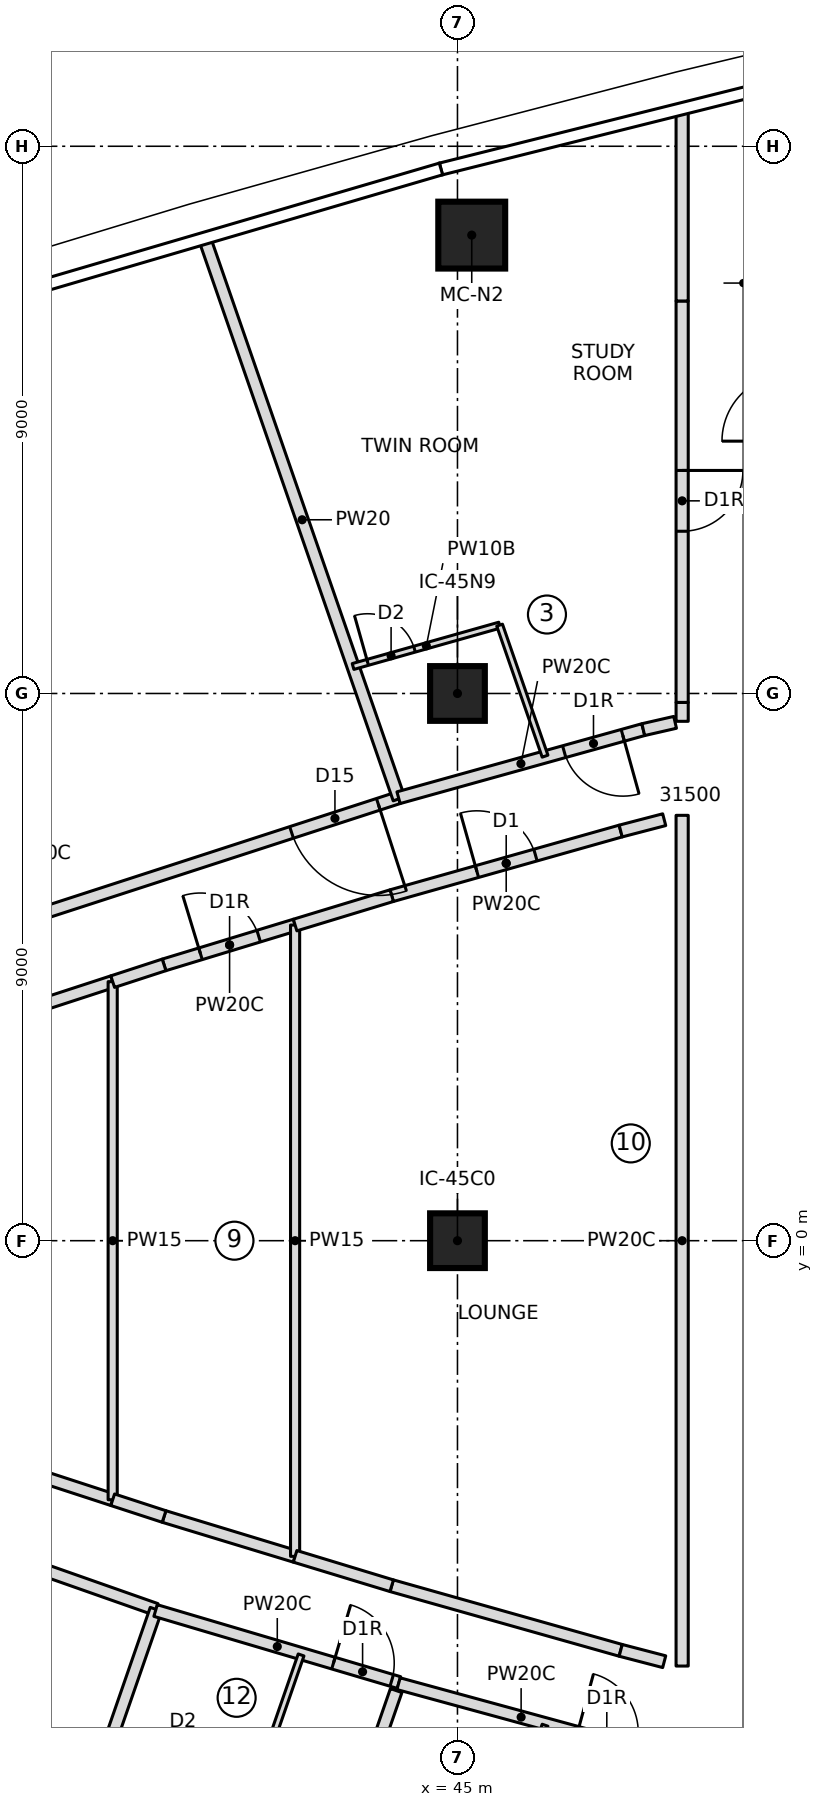
"""IFC4 building model, lengths in metres.
Left out: names, types, materials, properties, quantities, classifications, styles, units other than length and angle.
Written with IfcOpenShell. Run it as: python <this file> out.ifc"""

import sys

from ifc_helpers import new_model, si_unit, direction, frame, frame_2d, origin, origin_2d, place, context, subcontext, project, spatial, rectangle, extrude, element, fill, save


model = new_model("IFC4")
c1 = context("Model", 3, precision=1e-05, world=origin(), true_north=direction((0.0, 1.0)))
c2 = subcontext(c1, "Body", "Model", "MODEL_VIEW")
j1 = project(units=[si_unit("LENGTHUNIT", "METRE"), si_unit("PLANEANGLEUNIT", "RADIAN")], contexts=[c1])
p1 = place(None, origin())
s1 = spatial("IfcSite", under=j1, at=p1, CompositionType="ELEMENT")
p2 = place(p1, origin())
s2 = spatial("IfcBuilding", under=s1, at=p2, CompositionType="ELEMENT")
p3 = place(p2, frame((0.0, 0.0, 267.9)))
s3 = spatial("IfcBuildingStorey", under=s2, at=p3, CompositionType="ELEMENT", Elevation=267.9)
p4 = place(p3, frame((45.235, 16.539, 0.0), z_axis=(0.0, 0.0, 1.0), x_axis=(1.0, 0.0, 0.0)))
e1 = element("IfcColumn", 1, at=p4, inside=s3, PredefinedType="COLUMN", context=c2, shape_type="SweptSolid", body=[
    extrude(rectangle(XDim=1.1, YDim=1.1, at=origin_2d()), origin(), (0.0, 0.0, 1.0), 3.55),
])
for number, where, z_axis, x_axis in (
    (2, (45.0, 0.0, 0.0), (0.0, 0.0, 1.0), (1.0, 0.0, 0.0)),
    (3, (45.0, 9.0, 0.0), (0.0, 0.0, 1.0), (1.0, 0.0, 0.0)),
):
    element("IfcColumn", number, at=place(p3, frame(where, z_axis=z_axis, x_axis=x_axis)), inside=s3, PredefinedType="COLUMN", context=c2, shape_type="SweptSolid", body=[
        extrude(rectangle(XDim=0.9, YDim=0.9, at=origin_2d()), origin(), (0.0, 0.0, 1.0), 3.55),
    ])
p5 = place(p3, frame((44.031, 7.286, 0.0), z_axis=(0.0, 0.0, 1.0), x_axis=(-0.951130603276, -0.308788885019, 0.0)))
e4 = element("IfcWall", 4, at=p5, inside=s3, PredefinedType="PARTITIONING", context=c2, shape_type="SweptSolid", body=[
    extrude(rectangle(XDim=12.521, YDim=0.2, at=frame_2d((6.26, 0.0))), origin(), (0.0, 0.0, 1.0), 3.25),
])
p6 = place(p5, frame((0.35, 0.0, 0.0)))
e5 = element("IfcOpeningElement", 5, at=p6, cuts=e4, PredefinedType="OPENING", context=c2, shape_type="SweptSolid", body=[
    extrude(rectangle(XDim=1.5, YDim=2.1, at=frame_2d((0.75, 1.05))), frame((0.0, 0.11, 0.0), z_axis=(0.0, -1.0, 0.0), x_axis=(1.0, 0.0, 0.0)), (0.0, 0.0, 1.0), 0.22),
])
p7 = place(p3, frame((44.038, 7.267, 0.0), z_axis=(0.0, 0.0, 1.0), x_axis=(-0.327714576096, 0.944776776077, 0.0)))
e6 = element("IfcWall", 6, at=p7, inside=s3, PredefinedType="PARTITIONING", context=c2, shape_type="SweptSolid", body=[
    extrude(rectangle(XDim=9.717, YDim=0.2, at=frame_2d((4.858, 0.0))), origin(), (0.0, 0.0, 1.0), 3.25),
])
p8 = place(p3, frame((48.056, 8.405, 0.0), z_axis=(0.0, 0.0, 1.0), x_axis=(-0.963429942227, -0.267960344866, 0.0)))
e7 = element("IfcWall", 7, at=p8, inside=s3, PredefinedType="PARTITIONING", context=c2, shape_type="SweptSolid", body=[
    extrude(rectangle(XDim=4.177, YDim=0.2, at=frame_2d((2.089, 0.0))), origin(), (0.0, 0.0, 1.0), 3.25),
])
p9 = place(p8, frame((0.35, 0.0, 0.0)))
e8 = element("IfcOpeningElement", 8, at=p9, cuts=e7, PredefinedType="OPENING", context=c2, shape_type="SweptSolid", body=[
    extrude(rectangle(XDim=1.0, YDim=2.1, at=frame_2d((0.5, 1.05))), frame((0.0, 0.11, 0.0), z_axis=(0.0, -1.0, 0.0), x_axis=(1.0, 0.0, 0.0)), (0.0, 0.0, 1.0), 0.22),
])
p10 = place(p3, frame((43.283, 9.444, 0.0), z_axis=(0.0, 0.0, 1.0), x_axis=(0.962409173596, 0.271603723424, 0.0)))
e9 = element("IfcWall", 9, at=p10, inside=s3, PredefinedType="PARTITIONING", context=c2, shape_type="SweptSolid", body=[
    extrude(rectangle(XDim=2.504, YDim=0.1, at=frame_2d((1.252, 0.0))), origin(), (0.0, 0.0, 1.0), 3.25),
])
p11 = place(p10, frame((0.25, 0.0, 0.0)))
e10 = element("IfcOpeningElement", 10, at=p11, cuts=e9, PredefinedType="OPENING", context=c2, shape_type="SweptSolid", body=[
    extrude(rectangle(XDim=0.8, YDim=2.1, at=frame_2d((0.4, 1.05))), frame((0.0, 0.06, 0.0), z_axis=(0.0, -1.0, 0.0), x_axis=(1.0, 0.0, 0.0)), (0.0, 0.0, 1.0), 0.12),
])
p12 = place(p3, frame((45.693, 10.124, 0.0), z_axis=(0.0, 0.0, 1.0), x_axis=(0.327764902685, -0.944759317799, 0.0)))
e11 = element("IfcWall", 11, at=p12, inside=s3, PredefinedType="PARTITIONING", context=c2, shape_type="SweptSolid", body=[
    extrude(rectangle(XDim=2.281, YDim=0.1, at=frame_2d((1.14, 0.0))), origin(), (0.0, 0.0, 1.0), 3.25),
])
p13 = place(p3, frame((26.85, -1.423, 0.0), z_axis=(0.0, 0.0, 1.0), x_axis=(0.943328585164, -0.331860182022, 0.0)))
e12 = element("IfcWall", 12, at=p13, inside=s3, PredefinedType="PARTITIONING", context=c2, shape_type="SweptSolid", body=[
    extrude(rectangle(XDim=13.984, YDim=0.2, at=frame_2d((6.992, 0.0))), origin(), (0.0, 0.0, 1.0), 3.25),
])
p14 = place(p13, frame((3.05, 0.0, 0.0)))
e13 = element("IfcOpeningElement", 13, at=p14, cuts=e12, PredefinedType="OPENING", context=c2, shape_type="SweptSolid", body=[
    extrude(rectangle(XDim=1.5, YDim=2.1, at=frame_2d((0.75, 1.05))), frame((0.0, 0.11, 0.0), z_axis=(0.0, -1.0, 0.0), x_axis=(1.0, 0.0, 0.0)), (0.0, 0.0, 1.0), 0.22),
])
p15 = place(p3, frame((36.861, -15.235, 0.0), z_axis=(0.0, 0.0, 1.0), x_axis=(0.327710853631, 0.944778067279, 0.0)))
e14 = element("IfcWall", 14, at=p15, inside=s3, PredefinedType="PARTITIONING", context=c2, shape_type="SweptSolid", body=[
    extrude(rectangle(XDim=9.707, YDim=0.2, at=frame_2d((4.854, 0.0))), origin(), (0.0, 0.0, 1.0), 3.25),
])
p16 = place(p3, frame((40.035, -6.083, 0.0), z_axis=(0.0, 0.0, 1.0), x_axis=(0.958901312153, -0.283739799027, 0.0)))
e15 = element("IfcWall", 15, at=p16, inside=s3, PredefinedType="PARTITIONING", context=c2, shape_type="SweptSolid", body=[
    extrude(rectangle(XDim=4.174, YDim=0.2, at=frame_2d((2.087, 0.0))), origin(), (0.0, 0.0, 1.0), 3.25),
])
p17 = place(p16, frame((3.05, 0.0, 0.0)))
e16 = element("IfcOpeningElement", 16, at=p17, cuts=e15, PredefinedType="OPENING", context=c2, shape_type="SweptSolid", body=[
    extrude(rectangle(XDim=1.0, YDim=2.1, at=frame_2d((0.5, 1.05))), frame((0.0, 0.11, 0.0), z_axis=(0.0, -1.0, 0.0), x_axis=(1.0, 0.0, 0.0)), (0.0, 0.0, 1.0), 0.22),
])
p18 = place(p3, frame((42.428, -6.813, 0.0), z_axis=(0.0, 0.0, 1.0), x_axis=(-0.327743427431, -0.944766767925, 0.0)))
e17 = element("IfcWall", 17, at=p18, inside=s3, PredefinedType="PARTITIONING", context=c2, shape_type="SweptSolid", body=[
    extrude(rectangle(XDim=2.279, YDim=0.1, at=frame_2d((1.139, 0.0))), origin(), (0.0, 0.0, 1.0), 3.25),
])
p19 = place(p3, frame((40.854, -16.447, 0.0), z_axis=(0.0, 0.0, 1.0), x_axis=(0.327714654767, 0.944776748788, 0.0)))
e18 = element("IfcWall", 18, at=p19, inside=s3, PredefinedType="PARTITIONING", context=c2, shape_type="SweptSolid", body=[
    extrude(rectangle(XDim=9.577, YDim=0.2, at=frame_2d((4.788, 0.0))), origin(), (0.0, 0.0, 1.0), 3.25),
])
p20 = place(p3, frame((44.031, -7.286, 0.0), z_axis=(0.0, 0.0, 1.0), x_axis=(0.964708521199, -0.263320088726, 0.0)))
e19 = element("IfcWall", 19, at=p20, inside=s3, PredefinedType="PARTITIONING", context=c2, shape_type="SweptSolid", body=[
    extrude(rectangle(XDim=4.179, YDim=0.2, at=frame_2d((2.089, 0.0))), origin(), (0.0, 0.0, 1.0), 3.25),
])
p21 = place(p20, frame((3.05, 0.0, 0.0)))
e20 = element("IfcOpeningElement", 20, at=p21, cuts=e19, PredefinedType="OPENING", context=c2, shape_type="SweptSolid", body=[
    extrude(rectangle(XDim=1.0, YDim=2.1, at=frame_2d((0.5, 1.05))), frame((0.0, 0.11, 0.0), z_axis=(0.0, -1.0, 0.0), x_axis=(1.0, 0.0, 0.0)), (0.0, 0.0, 1.0), 0.22),
])
p22 = place(p3, frame((46.44, -7.969, 0.0), z_axis=(0.0, 0.0, 1.0), x_axis=(-0.327764902685, -0.944759317799, 0.0)))
e21 = element("IfcWall", 21, at=p22, inside=s3, PredefinedType="PARTITIONING", context=c2, shape_type="SweptSolid", body=[
    extrude(rectangle(XDim=2.281, YDim=0.1, at=frame_2d((1.14, 0.0))), origin(), (0.0, 0.0, 1.0), 3.25),
])
for number, where, z_axis, x_axis in (
    (22, (39.33, -4.26, 0.0), (0.0, 0.0, 1.0), (-0.951, 0.31, 0.0)),
    (23, (36.455, 3.323, 0.0), (0.0, 0.0, 1.0), (0.951, 0.31, 0.0)),
):
    element("IfcWall", number, at=place(p3, frame(where, z_axis=z_axis, x_axis=x_axis)), inside=s3, PredefinedType="PARTITIONING", context=c2, shape_type="SweptSolid", body=[
        extrude(rectangle(XDim=3.024, YDim=0.2, at=frame_2d((1.512, 0.0))), origin(), (0.0, 0.0, 1.0), 3.25),
    ])
p23 = place(p3, frame((39.33, -4.26, 0.0), z_axis=(0.0, 0.0, 1.0), x_axis=(0.0, 1.0, 0.0)))
e24 = element("IfcWall", 24, at=p23, inside=s3, PredefinedType="PARTITIONING", context=c2, shape_type="SweptSolid", body=[
    extrude(rectangle(XDim=8.521, YDim=0.15, at=frame_2d((4.26, 0.0))), origin(), (0.0, 0.0, 1.0), 3.25),
])
p24 = place(p3, frame((40.175, 4.536, 0.0), z_axis=(0.0, 0.0, 1.0), x_axis=(0.956739496331, 0.290945933396, 0.0)))
e25 = element("IfcWall", 25, at=p24, inside=s3, PredefinedType="PARTITIONING", context=c2, shape_type="SweptSolid", body=[
    extrude(rectangle(XDim=2.252, YDim=0.2, at=frame_2d((1.126, 0.0))), origin(), (0.0, 0.0, 1.0), 3.25),
])
p25 = place(p24, frame((0.626, 0.0, 0.0)))
e26 = element("IfcOpeningElement", 26, at=p25, cuts=e25, PredefinedType="OPENING", context=c2, shape_type="SweptSolid", body=[
    extrude(rectangle(XDim=1.0, YDim=2.1, at=frame_2d((0.5, 1.05))), frame((0.0, 0.11, 0.0), z_axis=(0.0, -1.0, 0.0), x_axis=(1.0, 0.0, 0.0)), (0.0, 0.0, 1.0), 0.22),
])
p26 = place(p3, frame((42.33, -5.191, 0.0), z_axis=(0.0, 0.0, 1.0), x_axis=(-0.956739496331, 0.290945933396, 0.0)))
e27 = element("IfcWall", 27, at=p26, inside=s3, PredefinedType="PARTITIONING", context=c2, shape_type="SweptSolid", body=[
    extrude(rectangle(XDim=2.252, YDim=0.2, at=frame_2d((1.126, 0.0))), origin(), (0.0, 0.0, 1.0), 3.25),
])
for number, where, z_axis, x_axis in (
    (28, (40.175, -4.536, 0.0), (0.0, 0.0, 1.0), (-0.951, 0.31, 0.0)),
    (29, (39.33, 4.26, 0.0), (0.0, 0.0, 1.0), (0.951, 0.31, 0.0)),
):
    element("IfcWall", number, at=place(p3, frame(where, z_axis=z_axis, x_axis=x_axis)), inside=s3, PredefinedType="PARTITIONING", context=c2, shape_type="SweptSolid", body=[
        extrude(rectangle(XDim=0.889, YDim=0.2, at=frame_2d((0.444, 0.0))), origin(), (0.0, 0.0, 1.0), 3.25),
    ])
p27 = place(p3, frame((42.33, -5.191, 0.0), z_axis=(0.0, 0.0, 1.0), x_axis=(0.0, 1.0, 0.0)))
e30 = element("IfcWall", 30, at=p27, inside=s3, PredefinedType="PARTITIONING", context=c2, shape_type="SweptSolid", body=[
    extrude(rectangle(XDim=10.383, YDim=0.15, at=frame_2d((5.191, 0.0))), origin(), (0.0, 0.0, 1.0), 3.25),
])
p28 = place(p3, frame((43.918, 5.675, 0.0), z_axis=(0.0, 0.0, 1.0), x_axis=(0.962411212211, 0.271596499628, 0.0)))
e31 = element("IfcWall", 31, at=p28, inside=s3, PredefinedType="PARTITIONING", context=c2, shape_type="SweptSolid", body=[
    extrude(rectangle(XDim=3.913, YDim=0.2, at=frame_2d((1.957, 0.0))), origin(), (0.0, 0.0, 1.0), 3.25),
])
p29 = place(p28, frame((1.457, 0.0, 0.0)))
e32 = element("IfcOpeningElement", 32, at=p29, cuts=e31, PredefinedType="OPENING", context=c2, shape_type="SweptSolid", body=[
    extrude(rectangle(XDim=1.0, YDim=2.1, at=frame_2d((0.5, 1.05))), frame((0.0, 0.11, 0.0), z_axis=(0.0, -1.0, 0.0), x_axis=(1.0, 0.0, 0.0)), (0.0, 0.0, 1.0), 0.22),
])
p30 = place(p3, frame((47.684, -6.738, 0.0), z_axis=(0.0, 0.0, 1.0), x_axis=(-0.962411212211, 0.271596499628, 0.0)))
e33 = element("IfcWall", 33, at=p30, inside=s3, PredefinedType="PARTITIONING", context=c2, shape_type="SweptSolid", body=[
    extrude(rectangle(XDim=3.913, YDim=0.2, at=frame_2d((1.957, 0.0))), origin(), (0.0, 0.0, 1.0), 3.25),
])
for number, where, z_axis, x_axis in (
    (34, (43.918, -5.675, 0.0), (0.0, 0.0, 1.0), (-0.957, 0.291, 0.0)),
    (35, (42.33, 5.191, 0.0), (0.0, 0.0, 1.0), (0.957, 0.291, 0.0)),
):
    element("IfcWall", number, at=place(p3, frame(where, z_axis=z_axis, x_axis=x_axis)), inside=s3, PredefinedType="PARTITIONING", context=c2, shape_type="SweptSolid", body=[
        extrude(rectangle(XDim=1.661, YDim=0.2, at=frame_2d((0.831, 0.0))), origin(), (0.0, 0.0, 1.0), 3.25),
    ])
for number, where, z_axis, x_axis in (
    (36, (47.684, 6.738, 0.0), (0.0, 0.0, 1.0), (0.968, 0.253, 0.0)),
    (37, (48.4, -6.924, 0.0), (0.0, 0.0, 1.0), (-0.968, 0.253, 0.0)),
):
    element("IfcWall", number, at=place(p3, frame(where, z_axis=z_axis, x_axis=x_axis)), inside=s3, PredefinedType="PARTITIONING", context=c2, shape_type="SweptSolid", body=[
        extrude(rectangle(XDim=0.74, YDim=0.2, at=frame_2d((0.37, 0.0))), origin(), (0.0, 0.0, 1.0), 3.25),
    ])
p31 = place(p3, frame((48.695, 15.455, 0.0), z_axis=(0.0, 0.0, 1.0), x_axis=(0.0, -1.0, 0.0)))
e38 = element("IfcWall", 38, at=p31, inside=s3, PredefinedType="PARTITIONING", context=c2, shape_type="SweptSolid", body=[
    extrude(rectangle(XDim=6.603, YDim=0.2, at=frame_2d((3.302, 0.0))), origin(), (0.0, 0.0, 1.0), 3.25),
])
p32 = place(p31, frame((2.787, 0.0, 0.0)))
e39 = element("IfcOpeningElement", 39, at=p32, cuts=e38, PredefinedType="OPENING", context=c2, shape_type="SweptSolid", body=[
    extrude(rectangle(XDim=1.0, YDim=2.1, at=frame_2d((0.5, 1.05))), frame((0.0, 0.11, 0.0), z_axis=(0.0, -1.0, 0.0), x_axis=(1.0, 0.0, 0.0)), (0.0, 0.0, 1.0), 0.22),
])
p33 = place(p3, frame((48.695, 6.996, 0.0), z_axis=(0.0, 0.0, 1.0), x_axis=(0.0, -1.0, 0.0)))
e40 = element("IfcWall", 40, at=p33, inside=s3, PredefinedType="PARTITIONING", context=c2, shape_type="SweptSolid", body=[
    extrude(rectangle(XDim=13.992, YDim=0.2, at=frame_2d((6.996, 0.0))), origin(), (0.0, 0.0, 1.0), 3.25),
])
p34 = place(p3, frame((48.695, 18.553, 0.0), z_axis=(0.0, 0.0, 1.0), x_axis=(0.0, -1.0, 0.0)))
e41 = element("IfcWall", 41, at=p34, inside=s3, PredefinedType="PARTITIONING", context=c2, shape_type="SweptSolid", body=[
    extrude(rectangle(XDim=3.098, YDim=0.2, at=frame_2d((1.549, 0.0))), origin(), (0.0, 0.0, 1.0), 3.25),
])
p35 = place(p3, frame((48.695, 8.852, 0.0), z_axis=(0.0, 0.0, 1.0), x_axis=(0.0, -1.0, 0.0)))
e42 = element("IfcWall", 42, at=p35, inside=s3, PredefinedType="PARTITIONING", context=c2, shape_type="SweptSolid", body=[
    extrude(rectangle(XDim=0.31, YDim=0.2, at=frame_2d((0.155, 0.0))), origin(), (0.0, 0.0, 1.0), 3.25),
])
p36 = place(p3, frame((48.579, 8.525, 0.0), z_axis=(0.0, 0.0, 1.0), x_axis=(-0.974742633665, -0.223331140051, 0.0)))
e43 = element("IfcWall", 43, at=p36, inside=s3, PredefinedType="PARTITIONING", context=c2, shape_type="SweptSolid", body=[
    extrude(rectangle(XDim=0.537, YDim=0.2, at=frame_2d((0.269, 0.0))), origin(), (0.0, 0.0, 1.0), 3.25),
])
p37 = place(p6, origin())
e44 = element("IfcDoor", 44, at=p37, inside=s3, OperationType="DOUBLE_DOOR_SINGLE_SWING", PredefinedType="DOOR", context=c2, shape_type="SweptSolid", body=[
    extrude(rectangle(XDim=1.5, YDim=2.1, at=frame_2d((0.75, 1.05))), frame((0.0, 0.025, 0.0), z_axis=(0.0, -1.0, 0.0), x_axis=(1.0, 0.0, 0.0)), (0.0, 0.0, 1.0), 0.05),
])
fill(e5, e44)
p38 = place(p11, origin())
e45 = element("IfcDoor", 45, at=p38, inside=s3, OperationType="SINGLE_SWING_LEFT", PredefinedType="DOOR", context=c2, shape_type="SweptSolid", body=[
    extrude(rectangle(XDim=0.8, YDim=2.1, at=frame_2d((0.4, 1.05))), frame((0.0, 0.025, 0.0), z_axis=(0.0, -1.0, 0.0), x_axis=(1.0, 0.0, 0.0)), (0.0, 0.0, 1.0), 0.05),
])
fill(e10, e45)
p39 = place(p9, origin())
e46 = element("IfcDoor", 46, at=p39, inside=s3, OperationType="SINGLE_SWING_RIGHT", PredefinedType="DOOR", context=c2, shape_type="SweptSolid", body=[
    extrude(rectangle(XDim=1.0, YDim=2.1, at=frame_2d((0.5, 1.05))), frame((0.0, 0.025, 0.0), z_axis=(0.0, -1.0, 0.0), x_axis=(1.0, 0.0, 0.0)), (0.0, 0.0, 1.0), 0.05),
])
fill(e8, e46)
p40 = place(p17, origin())
e47 = element("IfcDoor", 47, at=p40, inside=s3, OperationType="SINGLE_SWING_RIGHT", PredefinedType="DOOR", context=c2, shape_type="SweptSolid", body=[
    extrude(rectangle(XDim=1.0, YDim=2.1, at=frame_2d((0.5, 1.05))), frame((0.0, 0.025, 0.0), z_axis=(0.0, -1.0, 0.0), x_axis=(1.0, 0.0, 0.0)), (0.0, 0.0, 1.0), 0.05),
])
fill(e16, e47)
p41 = place(p25, origin())
e48 = element("IfcDoor", 48, at=p41, inside=s3, OperationType="SINGLE_SWING_RIGHT", PredefinedType="DOOR", context=c2, shape_type="SweptSolid", body=[
    extrude(rectangle(XDim=1.0, YDim=2.1, at=frame_2d((0.5, 1.05))), frame((0.0, 0.025, 0.0), z_axis=(0.0, -1.0, 0.0), x_axis=(1.0, 0.0, 0.0)), (0.0, 0.0, 1.0), 0.05),
])
fill(e26, e48)
p42 = place(p29, origin())
e49 = element("IfcDoor", 49, at=p42, inside=s3, OperationType="SINGLE_SWING_LEFT", PredefinedType="DOOR", context=c2, shape_type="SweptSolid", body=[
    extrude(rectangle(XDim=1.0, YDim=2.1, at=frame_2d((0.5, 1.05))), frame((0.0, 0.025, 0.0), z_axis=(0.0, -1.0, 0.0), x_axis=(1.0, 0.0, 0.0)), (0.0, 0.0, 1.0), 0.05),
])
fill(e32, e49)
p43 = place(p32, origin())
e50 = element("IfcDoor", 50, at=p43, inside=s3, OperationType="SINGLE_SWING_RIGHT", PredefinedType="DOOR", context=c2, shape_type="SweptSolid", body=[
    extrude(rectangle(XDim=1.0, YDim=2.1, at=frame_2d((0.5, 1.05))), frame((0.0, 0.025, 0.0), z_axis=(0.0, -1.0, 0.0), x_axis=(1.0, 0.0, 0.0)), (0.0, 0.0, 1.0), 0.05),
])
fill(e39, e50)
save(model, sys.argv[1])
